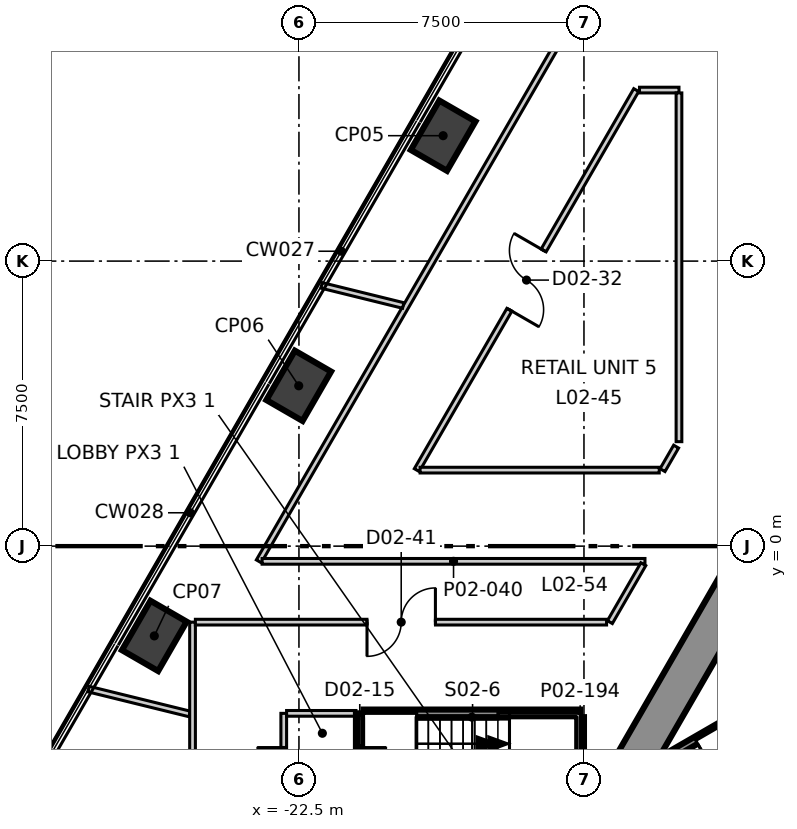
"""IFC4 building model, lengths in metres.
Left out: names, types, materials, properties, quantities, classifications, styles, units other than length and angle.
Written with IfcOpenShell. Run it as: python <this file> out.ifc"""

import sys

from ifc_helpers import new_model, si_unit, direction, frame, frame_2d, origin, origin_2d, place, context, subcontext, project, spatial, polyline, rectangle, outline, extrude, element, fill, save


model = new_model("IFC4")
c1 = context("Model", 3, precision=1e-05, world=origin(), true_north=direction((0.0, 1.0)))
c2 = subcontext(c1, "Body", "Model", "MODEL_VIEW")
j1 = project(units=[si_unit("LENGTHUNIT", "METRE"), si_unit("PLANEANGLEUNIT", "RADIAN")], contexts=[c1])
p1 = place(None, origin())
s1 = spatial("IfcSite", under=j1, at=p1, CompositionType="ELEMENT")
p2 = place(p1, origin())
s2 = spatial("IfcBuilding", under=s1, at=p2, CompositionType="ELEMENT")
p3 = place(p2, frame((0.0, 0.0, 14.5)))
s3 = spatial("IfcBuildingStorey", under=s2, at=p3, CompositionType="ELEMENT", Elevation=14.5)
p4 = place(p3, frame((-1.617, 15.2, -0.4), z_axis=(0.0, 0.0, 1.0), x_axis=(-0.499992141631, -0.866029940768, 0.0)))
e1 = element("IfcWall", 1, at=p4, inside=s3, PredefinedType="SHEAR", context=c2, shape_type="SweptSolid", body=[
    extrude(outline(polyline([(-0.289, -0.499), (1.656, -0.499), (3.601, -0.499), (5.547, -0.499), (7.492, -0.499), (9.437, -0.5), (11.382, -0.5), (13.328, -0.5), (15.273, -0.5), (17.218, -0.5), (19.163, -0.5), (21.109, -0.5), (23.054, -0.5), (24.999, -0.5), (24.422, 0.5), (22.566, 0.5), (20.709, 0.5), (18.853, 0.5), (16.997, 0.5), (15.14, 0.5), (13.284, 0.5), (11.427, 0.5), (9.571, 0.5), (7.715, 0.5), (5.858, 0.5), (4.002, 0.5), (2.146, 0.5), (0.289, 0.5), (-0.289, -0.499)])), origin(), (0.0, 0.0, 1.0), 5.4),
])
p5 = place(p4, frame((11.805, 0.0, 0.4)))
e2 = element("IfcOpeningElement", 2, at=p5, cuts=e1, PredefinedType="OPENING", context=c2, shape_type="SweptSolid", body=[
    extrude(rectangle(XDim=1.1, YDim=2.1, at=frame_2d((0.55, 1.05))), frame((0.0, 0.51, 0.0), z_axis=(0.0, -1.0, 0.0), x_axis=(1.0, 0.0, 0.0)), (0.0, 0.0, 1.0), 1.02),
])
for number, where, z_axis, x_axis in (
    (3, (-18.706, 10.8, -0.4), (0.0, 0.0, 1.0), (0.5, 0.866, 0.0)),
    (4, (-22.506, 4.219, -0.4), (0.0, 0.0, 1.0), (0.5, 0.866, 0.0)),
    (5, (-26.306, -2.362, -0.4), (0.0, 0.0, 1.0), (0.5, 0.866, 0.0)),
):
    element("IfcColumn", number, at=place(p3, frame(where, z_axis=z_axis, x_axis=x_axis)), inside=s3, PredefinedType="COLUMN", context=c2, shape_type="SweptSolid", body=[
        extrude(rectangle(XDim=1.5, YDim=1.1, at=origin_2d()), origin(), (0.0, 0.0, 1.0), 5.4),
    ])
p6 = place(p3, frame((-22.9, -7.525, 0.0), z_axis=(0.0, 0.0, 1.0), x_axis=(0.0, 1.0, 0.0)))
e6 = element("IfcWall", 6, at=p6, inside=s3, PredefinedType="PARTITIONING", context=c2, shape_type="SweptSolid", body=[
    extrude(rectangle(XDim=3.125, YDim=0.15, at=frame_2d((1.562, 0.0))), origin(), (0.0, 0.0, 1.0), 5.0),
])
p7 = place(p6, frame((0.825, 0.0, 0.0)))
e7 = element("IfcOpeningElement", 7, at=p7, cuts=e6, PredefinedType="OPENING", context=c2, shape_type="SweptSolid", body=[
    extrude(rectangle(XDim=1.4, YDim=2.1, at=frame_2d((0.7, 1.05))), frame((0.0, 0.085, 0.0), z_axis=(0.0, -1.0, 0.0), x_axis=(1.0, 0.0, 0.0)), (0.0, 0.0, 1.0), 0.17),
])
p8 = place(p3, frame((-22.825, -4.4, 0.0), z_axis=(0.0, 0.0, 1.0), x_axis=(1.0, 0.0, 0.0)))
e8 = element("IfcWall", 8, at=p8, inside=s3, PredefinedType="PARTITIONING", context=c2, shape_type="SweptSolid", body=[
    extrude(rectangle(XDim=1.825, YDim=0.15, at=frame_2d((0.913, 0.0))), origin(), (0.0, 0.0, 1.0), 5.0),
])
p9 = place(p3, frame((-28.037, -3.761, 0.0), z_axis=(0.0, 0.0, 1.0), x_axis=(0.971036815216, -0.238929913355, 0.0)))
e9 = element("IfcWall", 9, at=p9, inside=s3, PredefinedType="PARTITIONING", context=c2, shape_type="SweptSolid", body=[
    extrude(rectangle(XDim=2.741, YDim=0.15, at=frame_2d((1.371, 0.0))), origin(), (0.0, 0.0, 1.0), 5.0),
])
p10 = place(p3, frame((-25.3, -8.6, 0.0), z_axis=(0.0, 0.0, 1.0), x_axis=(0.0, 1.0, 0.0)))
e10 = element("IfcWall", 10, at=p10, inside=s3, PredefinedType="PARTITIONING", context=c2, shape_type="SweptSolid", body=[
    extrude(rectangle(XDim=6.6, YDim=0.15, at=frame_2d((3.3, 0.0))), origin(), (0.0, 0.0, 1.0), 5.0),
])
p11 = place(p3, frame((-23.556, -0.4, 0.0), z_axis=(0.0, 0.0, 1.0), x_axis=(0.500011000363, 0.866019052629, 0.0)))
e11 = element("IfcWall", 11, at=p11, inside=s3, PredefinedType="PARTITIONING", context=c2, shape_type="SweptSolid", body=[
    extrude(rectangle(XDim=17.089, YDim=0.15, at=frame_2d((8.545, 0.0))), origin(), (0.0, 0.0, 1.0), 5.0),
])
p12 = place(p3, frame((-23.469, -0.4, 0.0), z_axis=(0.0, 0.0, 1.0), x_axis=(1.0, 0.0, 0.0)))
e12 = element("IfcWall", 12, at=p12, inside=s3, PredefinedType="PARTITIONING", context=c2, shape_type="SweptSolid", body=[
    extrude(rectangle(XDim=10.074, YDim=0.15, at=frame_2d((5.037, 0.0))), origin(), (0.0, 0.0, 1.0), 5.0),
])
p13 = place(p3, frame((-14.318, -2.0, 0.0), z_axis=(0.0, 0.0, 1.0), x_axis=(0.499882500683, 0.86609323142, 0.0)))
e13 = element("IfcWall", 13, at=p13, inside=s3, PredefinedType="PARTITIONING", context=c2, shape_type="SweptSolid", body=[
    extrude(rectangle(XDim=1.761, YDim=0.15, at=frame_2d((0.88, 0.0))), origin(), (0.0, 0.0, 1.0), 5.0),
])
p14 = place(p3, frame((-25.225, -2.0, 0.0), z_axis=(0.0, 0.0, 1.0), x_axis=(1.0, 0.0, 0.0)))
e14 = element("IfcWall", 14, at=p14, inside=s3, PredefinedType="PARTITIONING", context=c2, shape_type="SweptSolid", body=[
    extrude(rectangle(XDim=10.82, YDim=0.15, at=frame_2d((5.41, 0.0))), origin(), (0.0, 0.0, 1.0), 4.4),
])
p15 = place(p14, frame((4.516, 0.0, 0.0)))
e15 = element("IfcOpeningElement", 15, at=p15, cuts=e14, PredefinedType="OPENING", context=c2, shape_type="SweptSolid", body=[
    extrude(rectangle(XDim=1.8, YDim=2.1, at=frame_2d((0.9, 1.05))), frame((0.0, 0.085, 0.0), z_axis=(0.0, -1.0, 0.0), x_axis=(1.0, 0.0, 0.0)), (0.0, 0.0, 1.0), 0.17),
])
p16 = place(p3, frame((-21.904, 6.861, 0.0), z_axis=(0.0, 0.0, 1.0), x_axis=(0.970980584994, -0.239158323219, 0.0)))
e16 = element("IfcWall", 16, at=p16, inside=s3, PredefinedType="PARTITIONING", context=c2, shape_type="SweptSolid", body=[
    extrude(rectangle(XDim=2.212, YDim=0.15, at=frame_2d((1.106, 0.0))), origin(), (0.0, 0.0, 1.0), 5.0),
])
p17 = place(p3, frame((-19.399, 2.0, 0.0), z_axis=(0.0, 0.0, 1.0), x_axis=(0.500027479704, 0.866009537788, 0.0)))
e17 = element("IfcWall", 17, at=p17, inside=s3, PredefinedType="PARTITIONING", context=c2, shape_type="SweptSolid", body=[
    extrude(rectangle(XDim=11.547, YDim=0.15, at=frame_2d((5.773, 0.0))), origin(), (0.0, 0.0, 1.0), 5.0),
])
p18 = place(p17, frame((4.874, 0.0, 0.0)))
e18 = element("IfcOpeningElement", 18, at=p18, cuts=e17, PredefinedType="OPENING", context=c2, shape_type="SweptSolid", body=[
    extrude(rectangle(XDim=1.8, YDim=2.1, at=frame_2d((0.9, 1.05))), frame((0.0, 0.085, 0.0), z_axis=(0.0, -1.0, 0.0), x_axis=(1.0, 0.0, 0.0)), (0.0, 0.0, 1.0), 0.17),
])
p19 = place(p3, frame((-13.539, 12.0, 0.0), z_axis=(0.0, 0.0, 1.0), x_axis=(1.0, 0.0, 0.0)))
e19 = element("IfcWall", 19, at=p19, inside=s3, PredefinedType="PARTITIONING", context=c2, shape_type="SweptSolid", body=[
    extrude(rectangle(XDim=1.039, YDim=0.15, at=frame_2d((0.52, 0.0))), origin(), (0.0, 0.0, 1.0), 5.0),
])
p20 = place(p3, frame((-12.5, 2.749, 0.0), z_axis=(0.0, 0.0, 1.0), x_axis=(0.0, 1.0, 0.0)))
e20 = element("IfcWall", 20, at=p20, inside=s3, PredefinedType="PARTITIONING", context=c2, shape_type="SweptSolid", body=[
    extrude(rectangle(XDim=9.176, YDim=0.15, at=frame_2d((4.588, 0.0))), origin(), (0.0, 0.0, 1.0), 5.0),
])
p21 = place(p3, frame((-12.933, 2.0, 0.0), z_axis=(0.0, 0.0, 1.0), x_axis=(0.500874756494, 0.865519773493, 0.0)))
e21 = element("IfcWall", 21, at=p21, inside=s3, PredefinedType="PARTITIONING", context=c2, shape_type="SweptSolid", body=[
    extrude(rectangle(XDim=0.715, YDim=0.15, at=frame_2d((0.357, 0.0))), origin(), (0.0, 0.0, 1.0), 5.0),
])
p22 = place(p3, frame((-19.312, 2.0, 0.0), z_axis=(0.0, 0.0, 1.0), x_axis=(1.0, 0.0, 0.0)))
e22 = element("IfcWall", 22, at=p22, inside=s3, PredefinedType="PARTITIONING", context=c2, shape_type="SweptSolid", body=[
    extrude(rectangle(XDim=6.293, YDim=0.15, at=frame_2d((3.146, 0.0))), origin(), (0.0, 0.0, 1.0), 4.45),
])
p23 = place(p3, frame((-13.946, -6.204, 0.0), z_axis=(0.0, 0.0, 1.0), x_axis=(0.866036527536, 0.499980732602, 0.0)))
e23 = element("IfcWall", 23, at=p23, inside=s3, PredefinedType="SOLIDWALL", context=c2, shape_type="SweptSolid", body=[
    extrude(rectangle(XDim=8.564, YDim=0.2, at=frame_2d((4.282, 0.0))), origin(), (0.0, 0.0, 1.0), 5.0),
])
p24 = place(p3, frame((-12.346, -8.976, 0.0), z_axis=(0.0, 0.0, 1.0), x_axis=(0.865987152174, 0.50006624788, 0.0)))
e24 = element("IfcWall", 24, at=p24, inside=s3, PredefinedType="SOLIDWALL", context=c2, shape_type="SweptSolid", body=[
    extrude(rectangle(XDim=8.565, YDim=0.2, at=frame_2d((4.282, 0.0))), origin(), (0.0, 0.0, 1.0), 5.0),
])
p25 = place(p3, frame((-20.9, -7.6, 0.0), z_axis=(0.0, 0.0, 1.0), x_axis=(0.0, 1.0, 0.0)))
e25 = element("IfcWall", 25, at=p25, inside=s3, PredefinedType="SOLIDWALL", context=c2, shape_type="SweptSolid", body=[
    extrude(rectangle(XDim=3.2, YDim=0.2, at=frame_2d((1.6, 0.0))), origin(), (0.0, 0.0, 1.0), 5.0),
])
p26 = place(p25, frame((0.9, 0.0, 0.0)))
e26 = element("IfcOpeningElement", 26, at=p26, cuts=e25, PredefinedType="OPENING", context=c2, shape_type="SweptSolid", body=[
    extrude(rectangle(XDim=1.4, YDim=2.1, at=frame_2d((0.7, 1.05))), frame((0.0, 0.11, 0.0), z_axis=(0.0, -1.0, 0.0), x_axis=(1.0, 0.0, 0.0)), (0.0, 0.0, 1.0), 0.22),
])
p27 = place(p3, frame((-20.8, -4.4, 0.0), z_axis=(0.0, 0.0, 1.0), x_axis=(1.0, 0.0, 0.0)))
e27 = element("IfcWall", 27, at=p27, inside=s3, PredefinedType="SOLIDWALL", context=c2, shape_type="SweptSolid", body=[
    extrude(rectangle(XDim=5.7, YDim=0.2, at=frame_2d((2.85, 0.0))), origin(), (0.0, 0.0, 1.0), 5.0),
])
p28 = place(p3, frame((-15.1, -7.6, 0.0), z_axis=(0.0, 0.0, 1.0), x_axis=(0.0, 1.0, 0.0)))
e28 = element("IfcWall", 28, at=p28, inside=s3, PredefinedType="SOLIDWALL", context=c2, shape_type="SweptSolid", body=[
    extrude(rectangle(XDim=3.1, YDim=0.2, at=frame_2d((1.55, 0.0))), origin(), (0.0, 0.0, 1.0), 5.0),
])
p29 = place(p26, origin())
e29 = element("IfcDoor", 29, at=p29, inside=s3, OperationType="DOUBLE_DOOR_SINGLE_SWING", PredefinedType="DOOR", context=c2, shape_type="SweptSolid", body=[
    extrude(rectangle(XDim=1.4, YDim=2.1, at=frame_2d((0.7, 1.05))), frame((0.0, 0.025, 0.0), z_axis=(0.0, -1.0, 0.0), x_axis=(1.0, 0.0, 0.0)), (0.0, 0.0, 1.0), 0.05),
])
fill(e26, e29)
p30 = place(p7, origin())
e30 = element("IfcDoor", 30, at=p30, inside=s3, OperationType="DOUBLE_DOOR_SINGLE_SWING", PredefinedType="DOOR", context=c2, shape_type="SweptSolid", body=[
    extrude(rectangle(XDim=1.4, YDim=2.1, at=frame_2d((0.7, 1.05))), frame((0.0, 0.025, 0.0), z_axis=(0.0, -1.0, 0.0), x_axis=(1.0, 0.0, 0.0)), (0.0, 0.0, 1.0), 0.05),
])
fill(e7, e30)
p31 = place(p18, origin())
e31 = element("IfcDoor", 31, at=p31, inside=s3, OperationType="DOUBLE_DOOR_SINGLE_SWING", PredefinedType="DOOR", context=c2, shape_type="SweptSolid", body=[
    extrude(rectangle(XDim=1.8, YDim=2.1, at=frame_2d((0.9, 1.05))), frame((0.0, 0.025, 0.0), z_axis=(0.0, -1.0, 0.0), x_axis=(1.0, 0.0, 0.0)), (0.0, 0.0, 1.0), 0.05),
])
fill(e18, e31)
p32 = place(p15, origin())
e32 = element("IfcDoor", 32, at=p32, inside=s3, OperationType="DOUBLE_DOOR_SINGLE_SWING", PredefinedType="DOOR", context=c2, shape_type="SweptSolid", body=[
    extrude(rectangle(XDim=1.8, YDim=2.1, at=frame_2d((0.9, 1.05))), frame((0.0, 0.025, 0.0), z_axis=(0.0, -1.0, 0.0), x_axis=(1.0, 0.0, 0.0)), (0.0, 0.0, 1.0), 0.05),
])
fill(e15, e32)
save(model, sys.argv[1])
